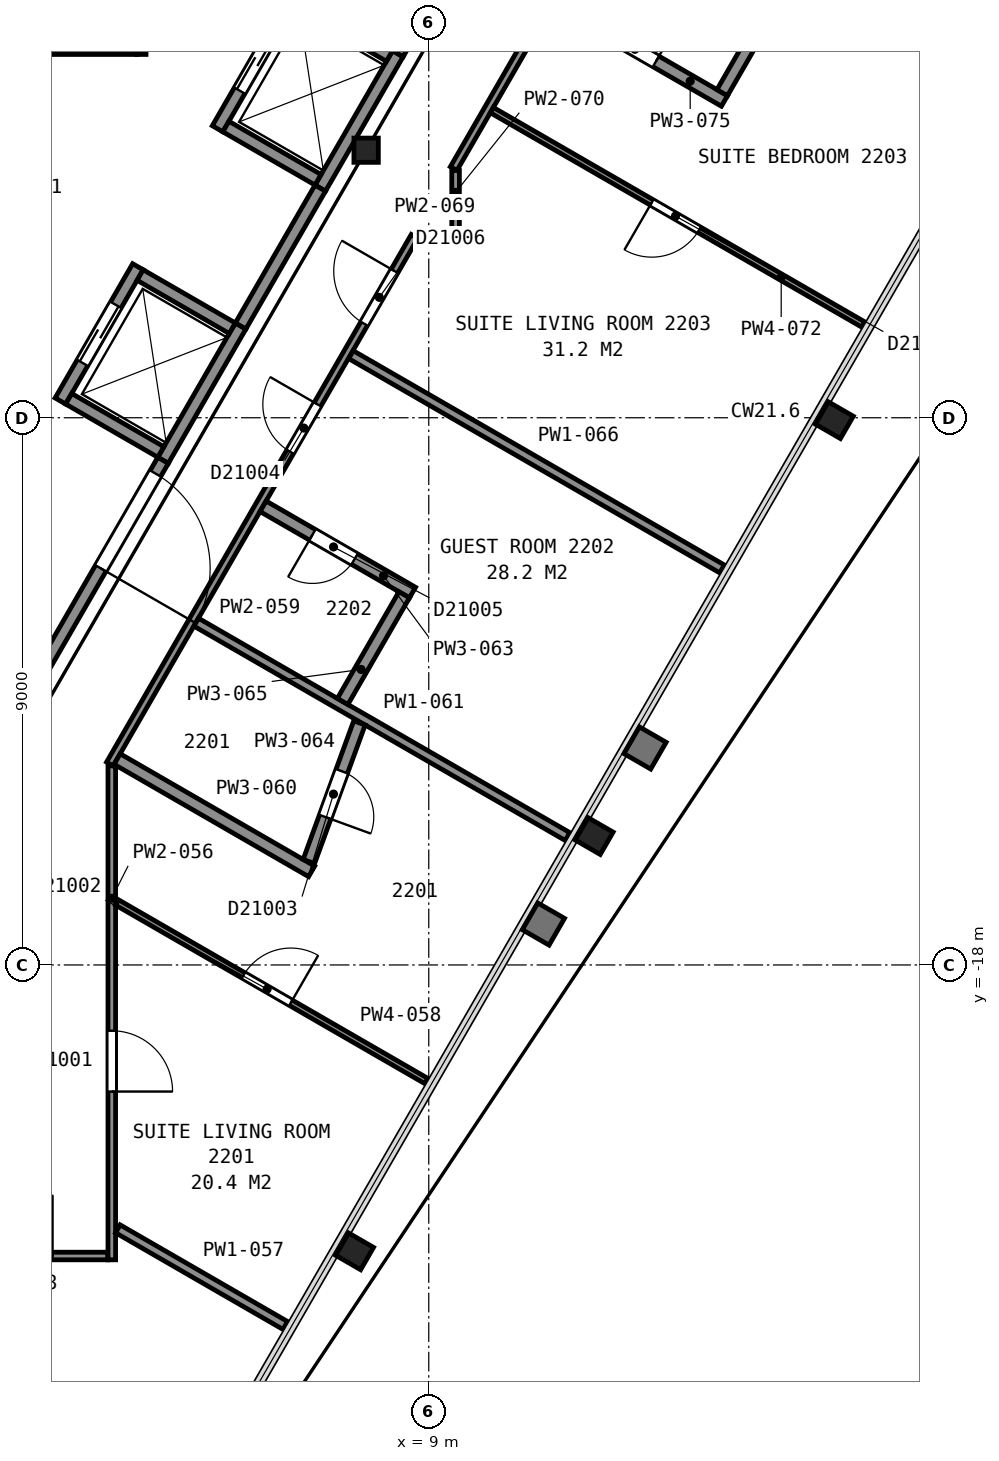
"""IFC4 building model, lengths in metres.
Left out: names, types, materials, properties, quantities, classifications, styles, units other than length and angle.
Written with IfcOpenShell. Run it as: python <this file> out.ifc"""

import sys

from ifc_helpers import new_model, si_unit, direction, frame, frame_2d, origin, origin_2d, place, context, subcontext, project, spatial, rectangle, i_section, extrude, element, fill, save


model = new_model("IFC4")
c1 = context("Model", 3, precision=1e-05, world=origin(), true_north=direction((0.0, 1.0)))
c2 = subcontext(c1, "Body", "Model", "MODEL_VIEW")
j1 = project(units=[si_unit("LENGTHUNIT", "METRE"), si_unit("PLANEANGLEUNIT", "RADIAN")], contexts=[c1])
p1 = place(None, origin())
s1 = spatial("IfcSite", under=j1, at=p1, CompositionType="ELEMENT")
p2 = place(p1, origin())
s2 = spatial("IfcBuilding", under=s1, at=p2, CompositionType="ELEMENT")
p3 = place(p2, frame((0.0, 0.0, 96.4)))
s3 = spatial("IfcBuildingStorey", under=s2, at=p3, CompositionType="ELEMENT", Elevation=96.4)
p4 = place(p3, frame((7.78, -22.71, 0.0), z_axis=(0.0, 0.0, 1.0), x_axis=(-0.5, -0.866025403784, 0.0)))
e1 = element("IfcColumn", 1, at=p4, inside=s3, PredefinedType="COLUMN", context=c2, shape_type="SweptSolid", body=[
    extrude(i_section(OverallWidth=0.424, OverallDepth=0.475, WebThickness=0.048, FlangeThickness=0.077, FilletRadius=0.015, at=origin_2d()), origin(), (0.0, 0.0, 1.0), 3.555),
])
p5 = place(p3, frame((11.72, -15.88, 0.0), z_axis=(0.0, 0.0, 1.0), x_axis=(-0.5, -0.866025403784, 0.0)))
e2 = element("IfcColumn", 2, at=p5, inside=s3, PredefinedType="COLUMN", context=c2, shape_type="SweptSolid", body=[
    extrude(i_section(OverallWidth=0.424, OverallDepth=0.475, WebThickness=0.048, FlangeThickness=0.077, FilletRadius=0.015, at=origin_2d()), origin(), (0.0, 0.0, 1.0), 3.56),
])
p6 = place(p3, frame((15.67, -9.04, 0.0), z_axis=(0.0, 0.0, 1.0), x_axis=(-0.5, -0.866025403784, 0.0)))
e3 = element("IfcColumn", 3, at=p6, inside=s3, PredefinedType="COLUMN", context=c2, shape_type="SweptSolid", body=[
    extrude(i_section(OverallWidth=0.424, OverallDepth=0.475, WebThickness=0.048, FlangeThickness=0.077, FilletRadius=0.015, at=origin_2d()), origin(), (0.0, 0.0, 1.0), 3.565),
])
p7 = place(p3, frame((7.97, -4.6, 0.0), z_axis=(0.0, 0.0, 1.0), x_axis=(1.0, 0.0, 0.0)))
e4 = element("IfcColumn", 4, at=p7, inside=s3, PredefinedType="COLUMN", context=c2, shape_type="SweptSolid", body=[
    extrude(i_section(OverallWidth=0.401, OverallDepth=0.399, WebThickness=0.025, FlangeThickness=0.04, FilletRadius=0.015, at=origin_2d()), origin(), (0.0, 0.0, 1.0), 3.6),
])
p8 = place(p3, frame((4.63, -9.7, 0.0), z_axis=(0.0, 0.0, 1.0), x_axis=(0.500062241894, 0.865989465428, 0.0)))
e5 = element("IfcWall", 5, at=p8, inside=s3, PredefinedType="PARTITIONING", context=c2, shape_type="SweptSolid", body=[
    extrude(rectangle(XDim=2.55, YDim=0.2, at=frame_2d((1.275, 0.0))), origin(), (0.0, 0.0, 1.0), 3.6),
])
p9 = place(p3, frame((7.216, -5.222, 0.0), z_axis=(0.0, 0.0, 1.0), x_axis=(0.499990435942, 0.866030925526, 0.0)))
e6 = element("IfcWall", 6, at=p9, inside=s3, PredefinedType="PARTITIONING", context=c2, shape_type="SweptSolid", body=[
    extrude(rectangle(XDim=2.55, YDim=0.2, at=frame_2d((1.275, 0.0))), origin(), (0.0, 0.0, 1.0), 3.6),
])
p10 = place(p3, frame((2.942, -8.725, 0.0), z_axis=(0.0, 0.0, 1.0), x_axis=(0.500020783669, 0.866013403995, 0.0)))
e7 = element("IfcWall", 7, at=p10, inside=s3, PredefinedType="PARTITIONING", context=c2, shape_type="SweptSolid", body=[
    extrude(rectangle(XDim=2.55, YDim=0.2, at=frame_2d((1.275, 0.0))), origin(), (0.0, 0.0, 1.0), 3.6),
])
p11 = place(p10, frame((0.725, 0.0, 0.0)))
e8 = element("IfcOpeningElement", 8, at=p11, cuts=e7, PredefinedType="OPENING", context=c2, shape_type="SweptSolid", body=[
    extrude(rectangle(XDim=1.1, YDim=2.1, at=frame_2d((0.55, 1.05))), frame((0.0, 0.11, 0.0), z_axis=(0.0, -1.0, 0.0), x_axis=(1.0, 0.0, 0.0)), (0.0, 0.0, 1.0), 0.22),
])
p12 = place(p3, frame((5.527, -4.247, 0.0), z_axis=(0.0, 0.0, 1.0), x_axis=(0.499938297808, 0.866061024631, 0.0)))
e9 = element("IfcWall", 9, at=p12, inside=s3, PredefinedType="PARTITIONING", context=c2, shape_type="SweptSolid", body=[
    extrude(rectangle(XDim=2.35, YDim=0.2, at=frame_2d((1.175, 0.0))), origin(), (0.0, 0.0, 1.0), 3.6),
])
p13 = place(p12, frame((0.725, 0.0, 0.0)))
e10 = element("IfcOpeningElement", 10, at=p13, cuts=e9, PredefinedType="OPENING", context=c2, shape_type="SweptSolid", body=[
    extrude(rectangle(XDim=1.1, YDim=2.1, at=frame_2d((0.55, 1.05))), frame((0.0, 0.11, 0.0), z_axis=(0.0, -1.0, 0.0), x_axis=(1.0, 0.0, 0.0)), (0.0, 0.0, 1.0), 0.22),
])
p14 = place(p3, frame((8.354, -3.051, 0.0), z_axis=(0.0, 0.0, 1.0), x_axis=(-0.866060182126, 0.499939757307, 0.0)))
e11 = element("IfcWall", 11, at=p14, inside=s3, PredefinedType="PARTITIONING", context=c2, shape_type="SweptSolid", body=[
    extrude(rectangle(XDim=2.95, YDim=0.2, at=frame_2d((1.475, 0.0))), origin(), (0.0, 0.0, 1.0), 3.6),
])
p15 = place(p3, frame((7.179, -5.086, 0.0), z_axis=(0.0, 0.0, 1.0), x_axis=(-0.866036909293, 0.499980071345, 0.0)))
e12 = element("IfcWall", 12, at=p15, inside=s3, PredefinedType="PARTITIONING", context=c2, shape_type="SweptSolid", body=[
    extrude(rectangle(XDim=1.75, YDim=0.2, at=frame_2d((0.875, 0.0))), origin(), (0.0, 0.0, 1.0), 3.6),
])
p16 = place(p3, frame((5.769, -7.528, 0.0), z_axis=(0.0, 0.0, 1.0), x_axis=(-0.866002029911, 0.500040482552, 0.0)))
e13 = element("IfcWall", 13, at=p16, inside=s3, PredefinedType="PARTITIONING", context=c2, shape_type="SweptSolid", body=[
    extrude(rectangle(XDim=1.75, YDim=0.2, at=frame_2d((0.875, 0.0))), origin(), (0.0, 0.0, 1.0), 3.6),
])
p17 = place(p3, frame((4.594, -9.563, 0.0), z_axis=(0.0, 0.0, 1.0), x_axis=(-0.866036909293, 0.499980071345, 0.0)))
e14 = element("IfcWall", 14, at=p17, inside=s3, PredefinedType="PARTITIONING", context=c2, shape_type="SweptSolid", body=[
    extrude(rectangle(XDim=1.75, YDim=0.2, at=frame_2d((0.875, 0.0))), origin(), (0.0, 0.0, 1.0), 3.6),
])
p18 = place(p3, frame((1.677, -14.815, 0.0), z_axis=(0.0, 0.0, 1.0), x_axis=(0.49999445743, 0.866028603765, 0.0)))
e15 = element("IfcWall", 15, at=p18, inside=s3, PredefinedType="PARTITIONING", context=c2, shape_type="SweptSolid", body=[
    extrude(rectangle(XDim=5.905, YDim=0.2, at=frame_2d((2.952, 0.0))), origin(), (0.0, 0.0, 1.0), 3.35),
])
p19 = place(p18, frame((3.855, 0.0, 0.0)))
e16 = element("IfcOpeningElement", 16, at=p19, cuts=e15, PredefinedType="OPENING", context=c2, shape_type="SweptSolid", body=[
    extrude(rectangle(XDim=1.8, YDim=2.1, at=frame_2d((0.9, 1.05))), frame((0.0, 0.11, 0.0), z_axis=(0.0, -1.0, 0.0), x_axis=(1.0, 0.0, 0.0)), (0.0, 0.0, 1.0), 0.22),
])
p20 = place(p3, frame((1.8, -2.95, 0.0), z_axis=(0.0, 0.0, 1.0), x_axis=(1.0, 0.0, 0.0)))
e17 = element("IfcWall", 17, at=p20, inside=s3, PredefinedType="PARTITIONING", context=c2, shape_type="SweptSolid", body=[
    extrude(rectangle(XDim=2.4, YDim=0.15, at=frame_2d((1.2, 0.0))), origin(), (0.0, 0.0, 1.0), 3.35),
])
p21 = place(p3, frame((4.275, -3.025, 0.0), z_axis=(0.0, 0.0, 1.0), x_axis=(0.0, 1.0, 0.0)))
e18 = element("IfcWall", 18, at=p21, inside=s3, PredefinedType="PARTITIONING", context=c2, shape_type="SweptSolid", body=[
    extrude(rectangle(XDim=2.923, YDim=0.15, at=frame_2d((1.461, 0.0))), origin(), (0.0, 0.0, 1.0), 3.35),
])
p22 = place(p3, frame((5.906, -7.49, 0.0), z_axis=(0.0, 0.0, 1.0), x_axis=(0.500252727967, 0.865879442048, 0.0)))
e19 = element("IfcWall", 19, at=p22, inside=s3, PredefinedType="PARTITIONING", context=c2, shape_type="SweptSolid", body=[
    extrude(rectangle(XDim=2.617, YDim=0.2, at=frame_2d((1.309, 0.0))), origin(), (0.0, 0.0, 1.0), 3.35),
])
p23 = place(p3, frame((8.492, -3.012, 0.0), z_axis=(0.0, 0.0, 1.0), x_axis=(0.499972957231, 0.866041016371, 0.0)))
e20 = element("IfcWall", 20, at=p23, inside=s3, PredefinedType="PARTITIONING", context=c2, shape_type="SweptSolid", body=[
    extrude(rectangle(XDim=10.349, YDim=0.2, at=frame_2d((5.174, 0.0))), origin(), (0.0, 0.0, 1.0), 3.35),
])
p24 = place(p3, frame((3.722, -22.787, 0.0), z_axis=(0.0, 0.0, 1.0), x_axis=(-1.0, 0.0, 0.0)))
e21 = element("IfcWall", 21, at=p24, inside=s3, PredefinedType="PARTITIONING", context=c2, shape_type="SweptSolid", body=[
    extrude(rectangle(XDim=2.971, YDim=0.125, at=frame_2d((1.486, 0.0))), origin(), (0.0, 0.0, 1.0), 2.613),
])
p25 = place(p24, frame((0.909, 0.0, 0.0)))
e22 = element("IfcOpeningElement", 22, at=p25, cuts=e21, PredefinedType="OPENING", context=c2, shape_type="SweptSolid", body=[
    extrude(rectangle(XDim=1.0, YDim=2.1, at=frame_2d((0.5, 1.05))), frame((0.0, 0.073, 0.0), z_axis=(0.0, -1.0, 0.0), x_axis=(1.0, 0.0, 0.0)), (0.0, 0.0, 1.0), 0.145),
])
p26 = place(p3, frame((3.787, -14.725, 0.0), z_axis=(0.0, 0.0, 1.0), x_axis=(0.0, -1.0, 0.0)))
e23 = element("IfcWall", 23, at=p26, inside=s3, PredefinedType="PARTITIONING", context=c2, shape_type="SweptSolid", body=[
    extrude(rectangle(XDim=8.125, YDim=0.125, at=frame_2d((4.062, 0.0))), origin(), (0.0, 0.0, 1.0), 2.613),
])
p27 = place(p26, frame((4.357, 0.0, 0.0)))
e24 = element("IfcOpeningElement", 24, at=p27, cuts=e23, PredefinedType="OPENING", context=c2, shape_type="SweptSolid", body=[
    extrude(rectangle(XDim=1.0, YDim=2.1, at=frame_2d((0.5, 1.05))), frame((0.0, 0.073, 0.0), z_axis=(0.0, -1.0, 0.0), x_axis=(1.0, 0.0, 0.0)), (0.0, 0.0, 1.0), 0.145),
])
p28 = place(p3, frame((3.887, -22.34, 0.0), z_axis=(0.0, 0.0, 1.0), x_axis=(0.866065365018, -0.499930778725, 0.0)))
e25 = element("IfcWall", 25, at=p28, inside=s3, PredefinedType="PARTITIONING", context=c2, shape_type="SweptSolid", body=[
    extrude(rectangle(XDim=3.179, YDim=0.15, at=frame_2d((1.589, 0.0))), origin(), (0.0, 0.0, 1.0), 2.613),
])
p29 = place(p3, frame((3.875, -16.972, 0.0), z_axis=(0.0, 0.0, 1.0), x_axis=(0.86602429061, -0.500001928069, 0.0)))
e26 = element("IfcWall", 26, at=p29, inside=s3, PredefinedType="PARTITIONING", context=c2, shape_type="SweptSolid", body=[
    extrude(rectangle(XDim=5.873, YDim=0.1, at=frame_2d((2.937, 0.0))), origin(), (0.0, 0.0, 1.0), 2.613),
])
p30 = place(p29, frame((2.399, 0.0, 0.0)))
e27 = element("IfcOpeningElement", 27, at=p30, cuts=e26, PredefinedType="OPENING", context=c2, shape_type="SweptSolid", body=[
    extrude(rectangle(XDim=0.9, YDim=2.1, at=frame_2d((0.45, 1.05))), frame((0.0, 0.06, 0.0), z_axis=(0.0, -1.0, 0.0), x_axis=(1.0, 0.0, 0.0)), (0.0, 0.0, 1.0), 0.12),
])
p31 = place(p3, frame((8.766, -6.017, 0.0), z_axis=(0.0, 0.0, 1.0), x_axis=(-0.500051472265, -0.865995684219, 0.0)))
e28 = element("IfcWall", 28, at=p31, inside=s3, PredefinedType="PARTITIONING", context=c2, shape_type="SweptSolid", body=[
    extrude(rectangle(XDim=10.02, YDim=0.125, at=frame_2d((5.01, 0.0))), origin(), (0.0, 0.0, 1.0), 2.613),
])
p32 = place(p31, frame((3.19, 0.0, 0.0)))
e29 = element("IfcOpeningElement", 29, at=p32, cuts=e28, PredefinedType="OPENING", context=c2, shape_type="SweptSolid", body=[
    extrude(rectangle(XDim=0.9, YDim=2.1, at=frame_2d((0.45, 1.05))), frame((0.0, 0.073, 0.0), z_axis=(0.0, -1.0, 0.0), x_axis=(1.0, 0.0, 0.0)), (0.0, 0.0, 1.0), 0.145),
])
p33 = place(p31, frame((0.658, 0.0, 0.0)))
e30 = element("IfcOpeningElement", 30, at=p33, cuts=e28, PredefinedType="OPENING", context=c2, shape_type="SweptSolid", body=[
    extrude(rectangle(XDim=1.0, YDim=2.1, at=frame_2d((0.5, 1.05))), frame((0.0, 0.073, 0.0), z_axis=(0.0, -1.0, 0.0), x_axis=(1.0, 0.0, 0.0)), (0.0, 0.0, 1.0), 0.145),
])
p34 = place(p3, frame((3.875, -14.613, 0.0), z_axis=(0.0, 0.0, 1.0), x_axis=(0.865890522866, -0.500233547866, 0.0)))
e31 = element("IfcWall", 31, at=p34, inside=s3, PredefinedType="PARTITIONING", context=c2, shape_type="SweptSolid", body=[
    extrude(rectangle(XDim=3.694, YDim=0.2, at=frame_2d((1.847, 0.0))), origin(), (0.0, 0.0, 1.0), 2.613),
])
p35 = place(p3, frame((5.175, -12.362, 0.0), z_axis=(0.0, 0.0, 1.0), x_axis=(0.866031654768, -0.499989172823, 0.0)))
e32 = element("IfcWall", 32, at=p35, inside=s3, PredefinedType="PARTITIONING", context=c2, shape_type="SweptSolid", body=[
    extrude(rectangle(XDim=7.052, YDim=0.15, at=frame_2d((3.526, 0.0))), origin(), (0.0, 0.0, 1.0), 2.613),
])
p36 = place(p3, frame((8.733, -11.875, 0.0), z_axis=(0.0, 0.0, 1.0), x_axis=(-0.866048046904, 0.499960778915, 0.0)))
e33 = element("IfcWall", 33, at=p36, inside=s3, PredefinedType="PARTITIONING", context=c2, shape_type="SweptSolid", body=[
    extrude(rectangle(XDim=2.838, YDim=0.2, at=frame_2d((1.419, 0.0))), origin(), (0.0, 0.0, 1.0), 2.613),
])
p37 = place(p36, frame((1.1, 0.0, 0.0)))
e34 = element("IfcOpeningElement", 34, at=p37, cuts=e33, PredefinedType="OPENING", context=c2, shape_type="SweptSolid", body=[
    extrude(rectangle(XDim=0.8, YDim=2.1, at=frame_2d((0.4, 1.05))), frame((0.0, 0.11, 0.0), z_axis=(0.0, -1.0, 0.0), x_axis=(1.0, 0.0, 0.0)), (0.0, 0.0, 1.0), 0.22),
])
p38 = place(p3, frame((7.028, -16.298, 0.0), z_axis=(0.0, 0.0, 1.0), x_axis=(0.342817359533, 0.939402074728, 0.0)))
e35 = element("IfcWall", 35, at=p38, inside=s3, PredefinedType="PARTITIONING", context=c2, shape_type="SweptSolid", body=[
    extrude(rectangle(XDim=2.426, YDim=0.2, at=frame_2d((1.213, 0.0))), origin(), (0.0, 0.0, 1.0), 2.613),
])
p39 = place(p38, frame((0.78, 0.0, 0.0)))
e36 = element("IfcOpeningElement", 36, at=p39, cuts=e35, PredefinedType="OPENING", context=c2, shape_type="SweptSolid", body=[
    extrude(rectangle(XDim=0.8, YDim=2.1, at=frame_2d((0.4, 1.05))), frame((0.0, 0.11, 0.0), z_axis=(0.0, -1.0, 0.0), x_axis=(1.0, 0.0, 0.0)), (0.0, 0.0, 1.0), 0.22),
])
p40 = place(p3, frame((7.583, -13.666, 0.0), z_axis=(0.0, 0.0, 1.0), x_axis=(0.49983374806, 0.866121368112, 0.0)))
e37 = element("IfcWall", 37, at=p40, inside=s3, PredefinedType="PARTITIONING", context=c2, shape_type="SweptSolid", body=[
    extrude(rectangle(XDim=2.026, YDim=0.2, at=frame_2d((1.013, 0.0))), origin(), (0.0, 0.0, 1.0), 2.613),
])
p41 = place(p3, frame((7.72, -7.963, 0.0), z_axis=(0.0, 0.0, 1.0), x_axis=(0.865980767462, -0.500077304409, 0.0)))
e38 = element("IfcWall", 38, at=p41, inside=s3, PredefinedType="PARTITIONING", context=c2, shape_type="SweptSolid", body=[
    extrude(rectangle(XDim=7.047, YDim=0.15, at=frame_2d((3.524, 0.0))), origin(), (0.0, 0.0, 1.0), 2.613),
])
p42 = place(p3, frame((8.82, -6.071, 0.0), z_axis=(0.0, 0.0, 1.0), x_axis=(1.0, 0.0, 0.0)))
e39 = element("IfcWall", 39, at=p42, inside=s3, PredefinedType="PARTITIONING", context=c2, shape_type="SweptSolid", body=[
    extrude(rectangle(XDim=0.556, YDim=0.125, at=frame_2d((0.278, 0.0))), origin(), (0.0, 0.0, 1.0), 2.613),
])
p43 = place(p3, frame((9.441, -6.134, 0.0), z_axis=(0.0, 0.0, 1.0), x_axis=(0.0, 1.0, 0.0)))
e40 = element("IfcWall", 40, at=p43, inside=s3, PredefinedType="PARTITIONING", context=c2, shape_type="SweptSolid", body=[
    extrude(rectangle(XDim=1.2, YDim=0.125, at=frame_2d((0.6, 0.0))), origin(), (0.0, 0.0, 1.0), 2.613),
])
p44 = place(p3, frame((9.41, -4.902, 0.0), z_axis=(0.0, 0.0, 1.0), x_axis=(0.499971244726, 0.866042005013, 0.0)))
e41 = element("IfcWall", 41, at=p44, inside=s3, PredefinedType="PARTITIONING", context=c2, shape_type="SweptSolid", body=[
    extrude(rectangle(XDim=10.052, YDim=0.125, at=frame_2d((5.026, 0.0))), origin(), (0.0, 0.0, 1.0), 2.613),
])
p45 = place(p3, frame((10.037, -3.94, 0.0), z_axis=(0.0, 0.0, 1.0), x_axis=(0.866063951978, -0.499933226626, 0.0)))
e42 = element("IfcWall", 42, at=p45, inside=s3, PredefinedType="PARTITIONING", context=c2, shape_type="SweptSolid", body=[
    extrude(rectangle(XDim=7.052, YDim=0.1, at=frame_2d((3.526, 0.0))), origin(), (0.0, 0.0, 1.0), 2.613),
])
p46 = place(p45, frame((3.038, 0.0, 0.0)))
e43 = element("IfcOpeningElement", 43, at=p46, cuts=e42, PredefinedType="OPENING", context=c2, shape_type="SweptSolid", body=[
    extrude(rectangle(XDim=0.9, YDim=2.1, at=frame_2d((0.45, 1.05))), frame((0.0, 0.06, 0.0), z_axis=(0.0, -1.0, 0.0), x_axis=(1.0, 0.0, 0.0)), (0.0, 0.0, 1.0), 0.12),
])
p47 = place(p3, frame((11.062, -2.174, 0.0), z_axis=(0.0, 0.0, 1.0), x_axis=(0.866078705744, -0.499907666931, 0.0)))
e44 = element("IfcWall", 44, at=p47, inside=s3, PredefinedType="PARTITIONING", context=c2, shape_type="SweptSolid", body=[
    extrude(rectangle(XDim=3.233, YDim=0.2, at=frame_2d((1.616, 0.0))), origin(), (0.0, 0.0, 1.0), 2.613),
])
p48 = place(p47, frame((1.133, 0.0, 0.0)))
e45 = element("IfcOpeningElement", 45, at=p48, cuts=e44, PredefinedType="OPENING", context=c2, shape_type="SweptSolid", body=[
    extrude(rectangle(XDim=0.8, YDim=2.1, at=frame_2d((0.4, 1.05))), frame((0.0, 0.11, 0.0), z_axis=(0.0, -1.0, 0.0), x_axis=(1.0, 0.0, 0.0)), (0.0, 0.0, 1.0), 0.22),
])
p49 = place(p3, frame((12.363, 0.078, 0.0), z_axis=(0.0, 0.0, 1.0), x_axis=(0.86605175433, -0.499954356739, 0.0)))
e46 = element("IfcWall", 46, at=p49, inside=s3, PredefinedType="PARTITIONING", context=c2, shape_type="SweptSolid", body=[
    extrude(rectangle(XDim=7.048, YDim=0.15, at=frame_2d((3.524, 0.0))), origin(), (0.0, 0.0, 1.0), 2.613),
])
p50 = place(p3, frame((13.826, -3.653, 0.0), z_axis=(0.0, 0.0, 1.0), x_axis=(0.499719542643, 0.866187265377, 0.0)))
e47 = element("IfcWall", 47, at=p50, inside=s3, PredefinedType="PARTITIONING", context=c2, shape_type="SweptSolid", body=[
    extrude(rectangle(XDim=2.42, YDim=0.2, at=frame_2d((1.21, 0.0))), origin(), (0.0, 0.0, 1.0), 2.613),
])
p51 = place(p11, origin())
e48 = element("IfcDoor", 48, at=p51, inside=s3, OperationType="SLIDING_TO_RIGHT", PredefinedType="DOOR", context=c2, shape_type="SweptSolid", body=[
    extrude(rectangle(XDim=1.1, YDim=2.1, at=frame_2d((0.55, 1.05))), frame((0.0, 0.025, 0.0), z_axis=(0.0, -1.0, 0.0), x_axis=(1.0, 0.0, 0.0)), (0.0, 0.0, 1.0), 0.05),
])
fill(e8, e48)
p52 = place(p13, origin())
e49 = element("IfcDoor", 49, at=p52, inside=s3, OperationType="SLIDING_TO_LEFT", PredefinedType="DOOR", context=c2, shape_type="SweptSolid", body=[
    extrude(rectangle(XDim=1.1, YDim=2.1, at=frame_2d((0.55, 1.05))), frame((0.0, 0.025, 0.0), z_axis=(0.0, -1.0, 0.0), x_axis=(1.0, 0.0, 0.0)), (0.0, 0.0, 1.0), 0.05),
])
fill(e10, e49)
p53 = place(p19, origin())
e50 = element("IfcDoor", 50, at=p53, inside=s3, OperationType="DOUBLE_DOOR_SINGLE_SWING", PredefinedType="DOOR", context=c2, shape_type="SweptSolid", body=[
    extrude(rectangle(XDim=1.8, YDim=2.1, at=frame_2d((0.9, 1.05))), frame((0.0, 0.025, 0.0), z_axis=(0.0, -1.0, 0.0), x_axis=(1.0, 0.0, 0.0)), (0.0, 0.0, 1.0), 0.05),
])
fill(e16, e50)
p54 = place(p25, origin())
e51 = element("IfcDoor", 51, at=p54, inside=s3, OperationType="SINGLE_SWING_LEFT", PredefinedType="DOOR", context=c2, shape_type="SweptSolid", body=[
    extrude(rectangle(XDim=1.0, YDim=2.1, at=frame_2d((0.5, 1.05))), frame((0.0, 0.025, 0.0), z_axis=(0.0, -1.0, 0.0), x_axis=(1.0, 0.0, 0.0)), (0.0, 0.0, 1.0), 0.05),
])
fill(e22, e51)
p55 = place(p27, origin())
e52 = element("IfcDoor", 52, at=p55, inside=s3, OperationType="SINGLE_SWING_RIGHT", PredefinedType="DOOR", context=c2, shape_type="SweptSolid", body=[
    extrude(rectangle(XDim=1.0, YDim=2.1, at=frame_2d((0.5, 1.05))), frame((0.0, 0.025, 0.0), z_axis=(0.0, -1.0, 0.0), x_axis=(1.0, 0.0, 0.0)), (0.0, 0.0, 1.0), 0.05),
])
fill(e24, e52)
p56 = place(p30, origin())
e53 = element("IfcDoor", 53, at=p56, inside=s3, OperationType="SINGLE_SWING_RIGHT", PredefinedType="DOOR", context=c2, shape_type="SweptSolid", body=[
    extrude(rectangle(XDim=0.9, YDim=2.1, at=frame_2d((0.45, 1.05))), frame((0.0, 0.025, 0.0), z_axis=(0.0, -1.0, 0.0), x_axis=(1.0, 0.0, 0.0)), (0.0, 0.0, 1.0), 0.05),
])
fill(e27, e53)
p57 = place(p32, origin())
e54 = element("IfcDoor", 54, at=p57, inside=s3, OperationType="SINGLE_SWING_LEFT", PredefinedType="DOOR", context=c2, shape_type="SweptSolid", body=[
    extrude(rectangle(XDim=0.9, YDim=2.1, at=frame_2d((0.45, 1.05))), frame((0.0, 0.025, 0.0), z_axis=(0.0, -1.0, 0.0), x_axis=(1.0, 0.0, 0.0)), (0.0, 0.0, 1.0), 0.05),
])
fill(e29, e54)
p58 = place(p33, origin())
e55 = element("IfcDoor", 55, at=p58, inside=s3, OperationType="SINGLE_SWING_LEFT", PredefinedType="DOOR", context=c2, shape_type="SweptSolid", body=[
    extrude(rectangle(XDim=1.0, YDim=2.1, at=frame_2d((0.5, 1.05))), frame((0.0, 0.025, 0.0), z_axis=(0.0, -1.0, 0.0), x_axis=(1.0, 0.0, 0.0)), (0.0, 0.0, 1.0), 0.05),
])
fill(e30, e55)
p59 = place(p37, origin())
e56 = element("IfcDoor", 56, at=p59, inside=s3, OperationType="SINGLE_SWING_RIGHT", PredefinedType="DOOR", context=c2, shape_type="SweptSolid", body=[
    extrude(rectangle(XDim=0.8, YDim=2.1, at=frame_2d((0.4, 1.05))), frame((0.0, 0.025, 0.0), z_axis=(0.0, -1.0, 0.0), x_axis=(1.0, 0.0, 0.0)), (0.0, 0.0, 1.0), 0.05),
])
fill(e34, e56)
p60 = place(p39, origin())
e57 = element("IfcDoor", 57, at=p60, inside=s3, OperationType="SINGLE_SWING_LEFT", PredefinedType="DOOR", context=c2, shape_type="SweptSolid", body=[
    extrude(rectangle(XDim=0.8, YDim=2.1, at=frame_2d((0.4, 1.05))), frame((0.0, 0.025, 0.0), z_axis=(0.0, -1.0, 0.0), x_axis=(1.0, 0.0, 0.0)), (0.0, 0.0, 1.0), 0.05),
])
fill(e36, e57)
p61 = place(p46, origin())
e58 = element("IfcDoor", 58, at=p61, inside=s3, OperationType="SINGLE_SWING_LEFT", PredefinedType="DOOR", context=c2, shape_type="SweptSolid", body=[
    extrude(rectangle(XDim=0.9, YDim=2.1, at=frame_2d((0.45, 1.05))), frame((0.0, 0.025, 0.0), z_axis=(0.0, -1.0, 0.0), x_axis=(1.0, 0.0, 0.0)), (0.0, 0.0, 1.0), 0.05),
])
fill(e43, e58)
p62 = place(p48, origin())
e59 = element("IfcDoor", 59, at=p62, inside=s3, OperationType="SINGLE_SWING_RIGHT", PredefinedType="DOOR", context=c2, shape_type="SweptSolid", body=[
    extrude(rectangle(XDim=0.8, YDim=2.1, at=frame_2d((0.4, 1.05))), frame((0.0, 0.025, 0.0), z_axis=(0.0, -1.0, 0.0), x_axis=(1.0, 0.0, 0.0)), (0.0, 0.0, 1.0), 0.05),
])
fill(e45, e59)
save(model, sys.argv[1])
